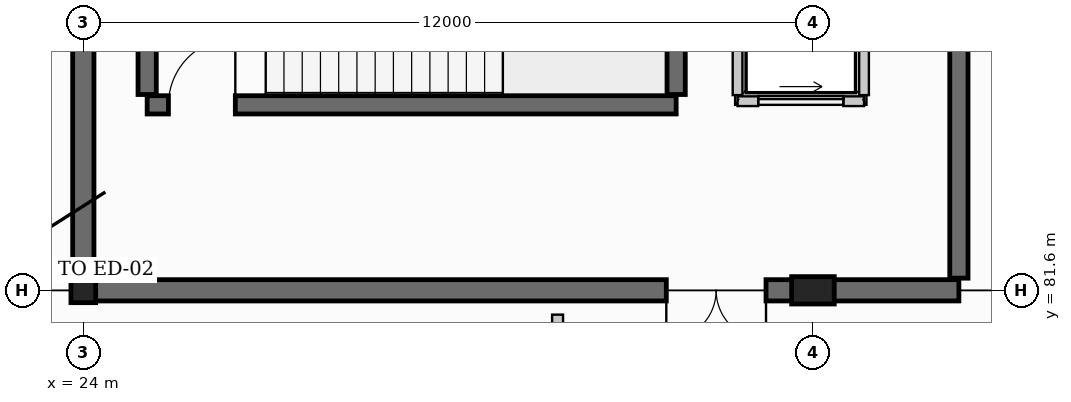
"""IFC4 building model, lengths in metres.
Left out: names, types, materials, properties, quantities, classifications, styles, units other than length and angle.
Written with IfcOpenShell. Run it as: python <this file> out.ifc"""

import sys

from ifc_helpers import new_model, si_unit, direction, frame, frame_2d, origin, origin_2d, place, context, subcontext, project, spatial, rectangle, hollow_circle, extrude, element, fill, save


model = new_model("IFC4")
c1 = context("Model", 3, precision=1e-05, world=origin(), true_north=direction((0.0, 1.0)))
c2 = subcontext(c1, "Body", "Model", "MODEL_VIEW")
j1 = project(units=[si_unit("LENGTHUNIT", "METRE"), si_unit("PLANEANGLEUNIT", "RADIAN")], contexts=[c1])
p1 = place(None, origin())
s1 = spatial("IfcSite", under=j1, at=p1, CompositionType="ELEMENT")
p2 = place(p1, origin())
s2 = spatial("IfcBuilding", under=s1, at=p2, CompositionType="ELEMENT")
p3 = place(p2, origin())
s3 = spatial("IfcBuildingStorey", under=s2, at=p3, CompositionType="ELEMENT", Elevation=0.0)
p4 = place(p3, frame((24.0, 81.6, 0.0), z_axis=(0.0, 0.0, 1.0), x_axis=(1.0, 0.0, 0.0)))
e1 = element("IfcColumn", 1, at=p4, inside=s3, PredefinedType="COLUMN", context=c2, shape_type="SweptSolid", body=[
    extrude(hollow_circle(Radius=0.203, WallThickness=0.016, at=origin_2d()), origin(), (0.0, 0.0, 1.0), 4.8),
])
p5 = place(p3, frame((36.0, 81.6, 0.0), z_axis=(0.0, 0.0, 1.0), x_axis=(0.0, 1.0, 0.0)))
e2 = element("IfcColumn", 2, at=p5, inside=s3, PredefinedType="PILASTER", context=c2, shape_type="SweptSolid", body=[
    extrude(rectangle(XDim=0.45, YDim=0.7, at=origin_2d()), origin(), (0.0, 0.0, 1.0), 4.8),
])
p6 = place(p3, frame((38.4, 81.6, 0.0), z_axis=(0.0, 0.0, 1.0), x_axis=(-1.0, 0.0, 0.0)))
e3 = element("IfcWall", 3, at=p6, inside=s3, PredefinedType="SHEAR", context=c2, shape_type="SweptSolid", body=[
    extrude(rectangle(XDim=14.4, YDim=0.35, at=frame_2d((7.2, 0.0))), origin(), (0.0, 0.0, 1.0), 4.8),
])
p7 = place(p6, frame((3.172, 0.0, 0.0)))
e4 = element("IfcOpeningElement", 4, at=p7, cuts=e3, PredefinedType="OPENING", context=c2, shape_type="SweptSolid", body=[
    extrude(rectangle(XDim=1.64, YDim=2.2, at=frame_2d((0.82, 1.1))), frame((0.0, 0.185, 0.0), z_axis=(0.0, -1.0, 0.0), x_axis=(1.0, 0.0, 0.0)), (0.0, 0.0, 1.0), 0.37),
])
p8 = place(p3, frame((24.0, 81.8, 0.0), z_axis=(0.0, 0.0, 1.0), x_axis=(0.0, 1.0, 0.0)))
e5 = element("IfcWall", 5, at=p8, inside=s3, PredefinedType="SHEAR", context=c2, shape_type="SweptSolid", body=[
    extrude(rectangle(XDim=8.0, YDim=0.35, at=frame_2d((4.0, 0.0))), origin(), (0.0, 0.0, 1.0), 4.8),
])
p9 = place(p3, frame((38.4, 89.8, 0.0), z_axis=(0.0, 0.0, 1.0), x_axis=(0.0, -1.0, 0.0)))
e6 = element("IfcWall", 6, at=p9, inside=s3, PredefinedType="SHEAR", context=c2, shape_type="SweptSolid", body=[
    extrude(rectangle(XDim=8.0, YDim=0.3, at=frame_2d((4.0, 0.0))), origin(), (0.0, 0.0, 1.0), 4.8),
])
p10 = place(p3, frame((25.05, 84.65, 0.0), z_axis=(0.0, 0.0, 1.0), x_axis=(1.0, 0.0, 0.0)))
e7 = element("IfcWall", 7, at=p10, inside=s3, PredefinedType="SHEAR", context=c2, shape_type="SweptSolid", body=[
    extrude(rectangle(XDim=8.7, YDim=0.3, at=frame_2d((4.35, 0.0))), origin(), (0.0, 0.0, 1.0), 4.8),
])
p11 = place(p10, frame((0.35, 0.0, 0.0)))
e8 = element("IfcOpeningElement", 8, at=p11, cuts=e7, PredefinedType="OPENING", context=c2, shape_type="SweptSolid", body=[
    extrude(rectangle(XDim=1.1, YDim=2.15, at=frame_2d((0.55, 1.075))), frame((0.0, 0.16, 0.0), z_axis=(0.0, -1.0, 0.0), x_axis=(1.0, 0.0, 0.0)), (0.0, 0.0, 1.0), 0.32),
])
for number, where, z_axis, x_axis in (
    (9, (25.05, 84.82, 0.0), (0.0, 0.0, 1.0), (0.0, 1.0, 0.0)),
    (10, (33.75, 84.82, 0.0), (0.0, 0.0, 1.0), (0.0, 1.0, 0.0)),
):
    element("IfcWall", number, at=place(p3, frame(where, z_axis=z_axis, x_axis=x_axis)), inside=s3, PredefinedType="SHEAR", context=c2, shape_type="SweptSolid", body=[
        extrude(rectangle(XDim=3.76, YDim=0.3, at=frame_2d((1.88, 0.0))), origin(), (0.0, 0.0, 1.0), 4.8),
    ])
p12 = place(p3, frame((34.76, 84.71, 0.0), z_axis=(0.0, 0.0, 1.0), x_axis=(1.0, 0.0, 0.0)))
e11 = element("IfcWall", 11, at=p12, inside=s3, PredefinedType="PARTITIONING", context=c2, shape_type="SweptSolid", body=[
    extrude(rectangle(XDim=2.08, YDim=0.16, at=frame_2d((1.04, 0.0))), origin(), (0.0, 0.0, 1.0), 4.445),
])
p13 = place(p12, frame((0.34, 0.0, 0.0)))
e12 = element("IfcOpeningElement", 12, at=p13, cuts=e11, PredefinedType="OPENING", context=c2, shape_type="SweptSolid", body=[
    extrude(rectangle(XDim=1.4, YDim=2.2, at=frame_2d((0.7, 1.1))), frame((0.0, 0.09, 0.0), z_axis=(0.0, -1.0, 0.0), x_axis=(1.0, 0.0, 0.0)), (0.0, 0.0, 1.0), 0.18),
])
for number, where, z_axis, x_axis in (
    (13, (34.76, 87.59, 0.0), (0.0, 0.0, 1.0), (0.0, -1.0, 0.0)),
    (14, (36.84, 84.81, 0.0), (0.0, 0.0, 1.0), (0.0, 1.0, 0.0)),
):
    element("IfcWall", number, at=place(p3, frame(where, z_axis=z_axis, x_axis=x_axis)), inside=s3, PredefinedType="PARTITIONING", context=c2, shape_type="SweptSolid", body=[
        extrude(rectangle(XDim=2.78, YDim=0.16, at=frame_2d((1.39, 0.0))), origin(), (0.0, 0.0, 1.0), 4.445),
    ])
p14 = place(p3, frame((31.8, 78.4, 0.0), z_axis=(0.0, 0.0, 1.0), x_axis=(0.0, 1.0, 0.0)))
e15 = element("IfcWall", 15, at=p14, inside=s3, PredefinedType="PARTITIONING", context=c2, shape_type="SweptSolid", body=[
    extrude(rectangle(XDim=2.8, YDim=0.18, at=frame_2d((1.4, 0.0))), origin(), (0.0, 0.0, 1.0), 4.445),
])
p15 = place(p13, origin())
e16 = element("IfcDoor", 16, at=p15, inside=s3, OperationType="SLIDING_TO_RIGHT", PredefinedType="DOOR", context=c2, shape_type="SweptSolid", body=[
    extrude(rectangle(XDim=1.4, YDim=2.2, at=frame_2d((0.7, 1.1))), frame((0.0, 0.025, 0.0), z_axis=(0.0, -1.0, 0.0), x_axis=(1.0, 0.0, 0.0)), (0.0, 0.0, 1.0), 0.05),
])
fill(e12, e16)
p16 = place(p11, origin())
e17 = element("IfcDoor", 17, at=p16, inside=s3, OperationType="SINGLE_SWING_RIGHT", PredefinedType="DOOR", context=c2, shape_type="SweptSolid", body=[
    extrude(rectangle(XDim=1.1, YDim=2.15, at=frame_2d((0.55, 1.075))), frame((0.0, 0.025, 0.0), z_axis=(0.0, -1.0, 0.0), x_axis=(1.0, 0.0, 0.0)), (0.0, 0.0, 1.0), 0.05),
])
fill(e8, e17)
p17 = place(p7, origin())
e18 = element("IfcDoor", 18, at=p17, inside=s3, OperationType="DOUBLE_DOOR_SINGLE_SWING", PredefinedType="DOOR", context=c2, shape_type="SweptSolid", body=[
    extrude(rectangle(XDim=1.64, YDim=2.2, at=frame_2d((0.82, 1.1))), frame((0.0, 0.025, 0.0), z_axis=(0.0, -1.0, 0.0), x_axis=(1.0, 0.0, 0.0)), (0.0, 0.0, 1.0), 0.05),
])
fill(e4, e18)
save(model, sys.argv[1])
